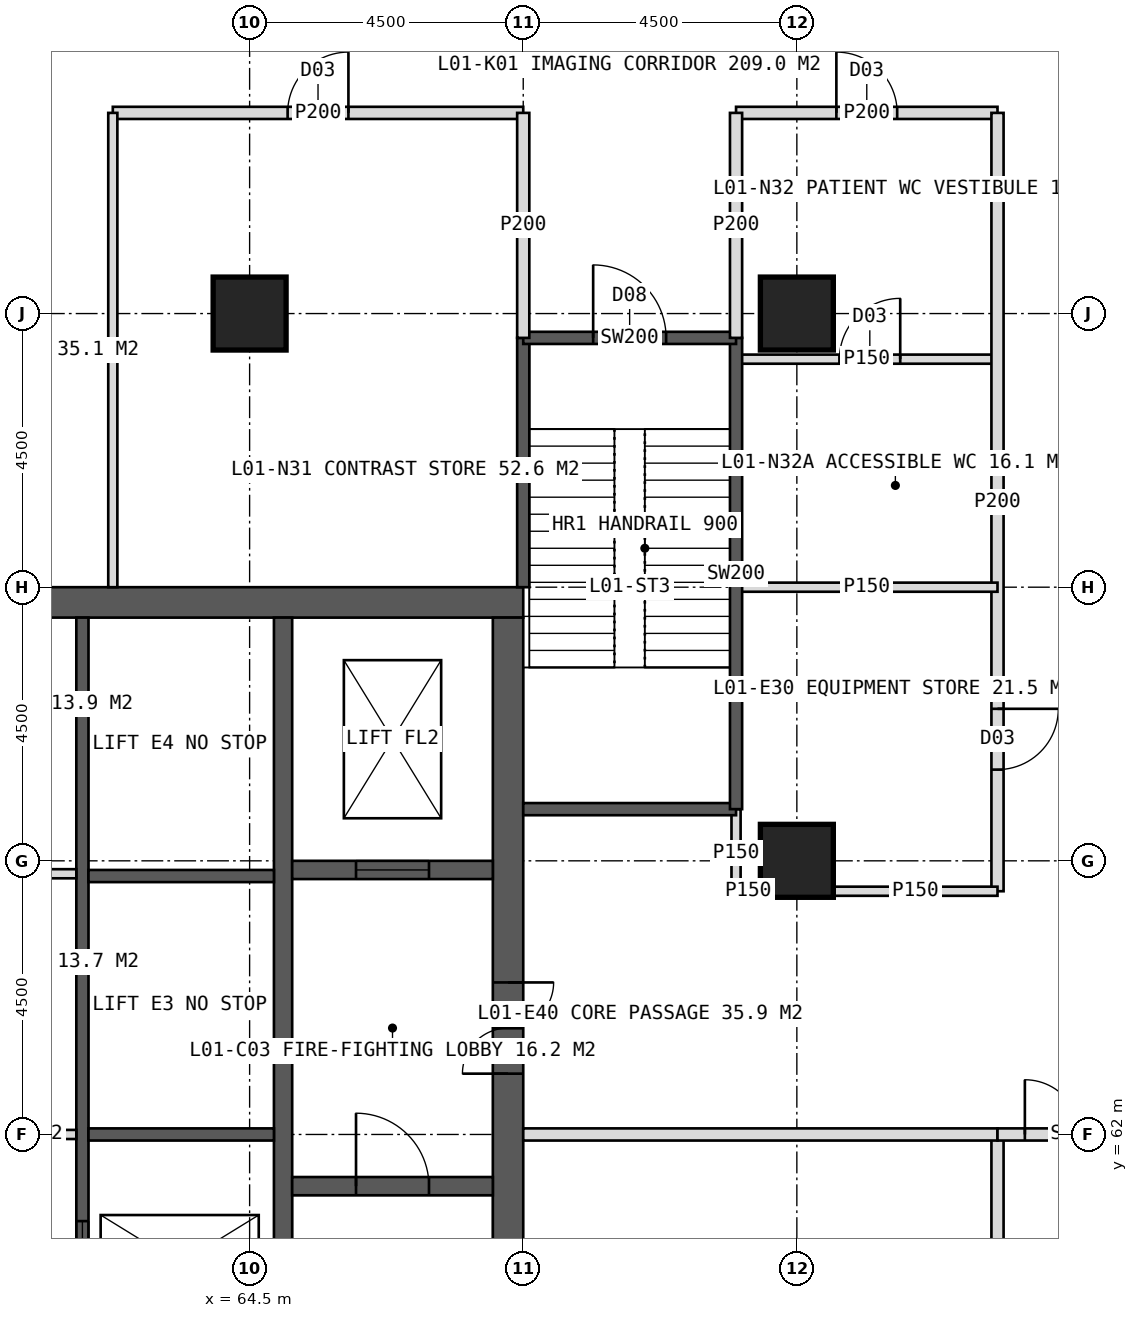
"""IFC4 building model, lengths in metres.
Left out: names, types, materials, properties, quantities, classifications, styles, units other than length and angle.
Written with IfcOpenShell. Run it as: python <this file> out.ifc"""

import sys

from ifc_helpers import new_model, si_unit, direction, frame, frame_2d, origin, origin_2d, place, context, subcontext, project, spatial, rectangle, hollow_rectangle, extrude, element, fill, save


model = new_model("IFC4")
c1 = context("Model", 3, precision=1e-05, world=origin(), true_north=direction((0.0, 1.0)))
c2 = subcontext(c1, "Body", "Model", "MODEL_VIEW")
j1 = project(units=[si_unit("LENGTHUNIT", "METRE"), si_unit("PLANEANGLEUNIT", "RADIAN")], contexts=[c1])
p1 = place(None, origin())
s1 = spatial("IfcSite", under=j1, at=p1, CompositionType="ELEMENT")
p2 = place(p1, origin())
s2 = spatial("IfcBuilding", under=s1, at=p2, CompositionType="ELEMENT")
p3 = place(p2, frame((0.0, 0.0, 6.0)))
s3 = spatial("IfcBuildingStorey", under=s2, at=p3, CompositionType="ELEMENT", Elevation=6.0)
p4 = place(p3, frame((51.0, 70.75, 0.0), z_axis=(0.0, 0.0, 1.0), x_axis=(1.0, 0.0, 0.0)))
e1 = element("IfcWall", 1, at=p4, inside=s3, PredefinedType="SHEAR", context=c2, shape_type="SweptSolid", body=[
    extrude(rectangle(XDim=18.0, YDim=0.5, at=frame_2d((9.0, 0.0))), origin(), (0.0, 0.0, 1.0), 5.0),
])
p5 = place(p4, frame((8.1, 0.0, 0.0)))
e2 = element("IfcOpeningElement", 2, at=p5, cuts=e1, PredefinedType="OPENING", context=c2, shape_type="SweptSolid", body=[
    extrude(rectangle(XDim=1.8, YDim=2.2, at=frame_2d((0.9, 1.1))), frame((0.0, 0.26, 0.0), z_axis=(0.0, -1.0, 0.0), x_axis=(1.0, 0.0, 0.0)), (0.0, 0.0, 1.0), 0.52),
])
p6 = place(p3, frame((68.75, 53.5, 0.0), z_axis=(0.0, 0.0, 1.0), x_axis=(0.0, 1.0, 0.0)))
e3 = element("IfcWall", 3, at=p6, inside=s3, PredefinedType="SHEAR", context=c2, shape_type="SweptSolid", body=[
    extrude(rectangle(XDim=17.0, YDim=0.5, at=frame_2d((8.5, 0.0))), origin(), (0.0, 0.0, 1.0), 5.0),
])
p7 = place(p6, frame((9.5, 0.0, 0.0)))
e4 = element("IfcOpeningElement", 4, at=p7, cuts=e3, PredefinedType="OPENING", context=c2, shape_type="SweptSolid", body=[
    extrude(rectangle(XDim=1.5, YDim=2.2, at=frame_2d((0.75, 1.1))), frame((0.0, 0.26, 0.0), z_axis=(0.0, -1.0, 0.0), x_axis=(1.0, 0.0, 0.0)), (0.0, 0.0, 1.0), 0.52),
])
p8 = place(p3, frame((65.05, 53.5, 0.0), z_axis=(0.0, 0.0, 1.0), x_axis=(0.0, 1.0, 0.0)))
e5 = element("IfcWall", 5, at=p8, inside=s3, PredefinedType="SHEAR", context=c2, shape_type="SweptSolid", body=[
    extrude(rectangle(XDim=17.0, YDim=0.3, at=frame_2d((8.5, 0.0))), origin(), (0.0, 0.0, 1.0), 5.0),
])
p9 = place(p3, frame((61.75, 53.5, 0.0), z_axis=(0.0, 0.0, 1.0), x_axis=(0.0, 1.0, 0.0)))
e6 = element("IfcWall", 6, at=p9, inside=s3, PredefinedType="SHEAR", context=c2, shape_type="SweptSolid", body=[
    extrude(rectangle(XDim=17.0, YDim=0.2, at=frame_2d((8.5, 0.0))), origin(), (0.0, 0.0, 1.0), 5.0),
])
p10 = place(p9, frame((1.375, 0.0, 0.0)))
e7 = element("IfcOpeningElement", 7, at=p10, cuts=e6, PredefinedType="OPENING", context=c2, shape_type="SweptSolid", body=[
    extrude(rectangle(XDim=1.4, YDim=2.2, at=frame_2d((0.7, 1.1))), frame((0.0, 0.11, 0.0), z_axis=(0.0, -1.0, 0.0), x_axis=(1.0, 0.0, 0.0)), (0.0, 0.0, 1.0), 0.22),
])
p11 = place(p9, frame((5.675, 0.0, 0.0)))
e8 = element("IfcOpeningElement", 8, at=p11, cuts=e6, PredefinedType="OPENING", context=c2, shape_type="SweptSolid", body=[
    extrude(rectangle(XDim=1.4, YDim=2.2, at=frame_2d((0.7, 1.1))), frame((0.0, 0.11, 0.0), z_axis=(0.0, -1.0, 0.0), x_axis=(1.0, 0.0, 0.0)), (0.0, 0.0, 1.0), 0.22),
])
for number, where, z_axis, x_axis in (
    (9, (61.85, 62.0, 0.0), (0.0, 0.0, 1.0), (1.0, 0.0, 0.0)),
    (10, (61.85, 66.25, 0.0), (0.0, 0.0, 1.0), (1.0, 0.0, 0.0)),
):
    element("IfcWall", number, at=place(p3, frame(where, z_axis=z_axis, x_axis=x_axis)), inside=s3, PredefinedType="SHEAR", context=c2, shape_type="SweptSolid", body=[
        extrude(rectangle(XDim=3.05, YDim=0.2, at=frame_2d((1.525, 0.0))), origin(), (0.0, 0.0, 1.0), 5.0),
    ])
p12 = place(p3, frame((65.2, 61.15, 0.0), z_axis=(0.0, 0.0, 1.0), x_axis=(1.0, 0.0, 0.0)))
e11 = element("IfcWall", 11, at=p12, inside=s3, PredefinedType="SHEAR", context=c2, shape_type="SweptSolid", body=[
    extrude(rectangle(XDim=3.3, YDim=0.3, at=frame_2d((1.65, 0.0))), origin(), (0.0, 0.0, 1.0), 5.0),
])
p13 = place(p12, frame((1.05, 0.0, 0.0)))
e12 = element("IfcOpeningElement", 12, at=p13, cuts=e11, PredefinedType="OPENING", context=c2, shape_type="SweptSolid", body=[
    extrude(rectangle(XDim=1.2, YDim=2.1, at=frame_2d((0.6, 1.05))), frame((0.0, 0.16, 0.0), z_axis=(0.0, -1.0, 0.0), x_axis=(1.0, 0.0, 0.0)), (0.0, 0.0, 1.0), 0.32),
])
p14 = place(p3, frame((65.2, 66.35, 0.0), z_axis=(0.0, 0.0, 1.0), x_axis=(1.0, 0.0, 0.0)))
e13 = element("IfcWall", 13, at=p14, inside=s3, PredefinedType="SHEAR", context=c2, shape_type="SweptSolid", body=[
    extrude(rectangle(XDim=3.3, YDim=0.3, at=frame_2d((1.65, 0.0))), origin(), (0.0, 0.0, 1.0), 5.0),
])
p15 = place(p14, frame((1.05, 0.0, 0.0)))
e14 = element("IfcOpeningElement", 14, at=p15, cuts=e13, PredefinedType="OPENING", context=c2, shape_type="SweptSolid", body=[
    extrude(rectangle(XDim=1.2, YDim=2.2, at=frame_2d((0.6, 1.1))), frame((0.0, 0.16, 0.0), z_axis=(0.0, -1.0, 0.0), x_axis=(1.0, 0.0, 0.0)), (0.0, 0.0, 1.0), 0.32),
])
for number, where, z_axis, x_axis in (
    (15, (73.5, 75.5, 0.0), (0.0, 0.0, 1.0), (1.0, 0.0, 0.0)),
    (16, (64.5, 75.5, 0.0), (0.0, 0.0, 1.0), (1.0, 0.0, 0.0)),
    (17, (73.5, 66.5, 0.0), (0.0, 0.0, 1.0), (1.0, 0.0, 0.0)),
):
    element("IfcColumn", number, at=place(p3, frame(where, z_axis=z_axis, x_axis=x_axis)), inside=s3, PredefinedType="COLUMN", context=c2, shape_type="SweptSolid", body=[
        extrude(hollow_rectangle(XDim=1.2, YDim=1.2, WallThickness=0.1, at=origin_2d()), origin(), (0.0, 0.0, 1.0), 5.0),
    ])
p16 = place(p3, frame((62.25, 78.8, 0.0), z_axis=(0.0, 0.0, 1.0), x_axis=(1.0, 0.0, 0.0)))
e18 = element("IfcWall", 18, at=p16, inside=s3, PredefinedType="PARTITIONING", context=c2, shape_type="SweptSolid", body=[
    extrude(rectangle(XDim=6.75, YDim=0.2, at=frame_2d((3.375, 0.0))), origin(), (0.0, 0.0, 1.0), 4.7),
])
p17 = place(p16, frame((2.875, 0.0, 0.0)))
e19 = element("IfcOpeningElement", 19, at=p17, cuts=e18, PredefinedType="OPENING", context=c2, shape_type="SweptSolid", body=[
    extrude(rectangle(XDim=1.0, YDim=2.1, at=frame_2d((0.5, 1.05))), frame((0.0, 0.11, 0.0), z_axis=(0.0, -1.0, 0.0), x_axis=(1.0, 0.0, 0.0)), (0.0, 0.0, 1.0), 0.22),
])
p18 = place(p3, frame((72.5, 78.8, 0.0), z_axis=(0.0, 0.0, 1.0), x_axis=(1.0, 0.0, 0.0)))
e20 = element("IfcWall", 20, at=p18, inside=s3, PredefinedType="PARTITIONING", context=c2, shape_type="SweptSolid", body=[
    extrude(rectangle(XDim=4.3, YDim=0.2, at=frame_2d((2.15, 0.0))), origin(), (0.0, 0.0, 1.0), 4.7),
])
p19 = place(p18, frame((1.65, 0.0, 0.0)))
e21 = element("IfcOpeningElement", 21, at=p19, cuts=e20, PredefinedType="OPENING", context=c2, shape_type="SweptSolid", body=[
    extrude(rectangle(XDim=1.0, YDim=2.1, at=frame_2d((0.5, 1.05))), frame((0.0, 0.11, 0.0), z_axis=(0.0, -1.0, 0.0), x_axis=(1.0, 0.0, 0.0)), (0.0, 0.0, 1.0), 0.22),
])
p20 = place(p3, frame((62.25, 71.0, 0.0), z_axis=(0.0, 0.0, 1.0), x_axis=(0.0, 1.0, 0.0)))
e22 = element("IfcWall", 22, at=p20, inside=s3, PredefinedType="PARTITIONING", context=c2, shape_type="SweptSolid", body=[
    extrude(rectangle(XDim=7.8, YDim=0.15, at=frame_2d((3.9, 0.0))), origin(), (0.0, 0.0, 1.0), 4.7),
])
p21 = place(p3, frame((72.5, 74.75, 0.0), z_axis=(0.0, 0.0, 1.0), x_axis=(1.0, 0.0, 0.0)))
e23 = element("IfcWall", 23, at=p21, inside=s3, PredefinedType="PARTITIONING", context=c2, shape_type="SweptSolid", body=[
    extrude(rectangle(XDim=4.3, YDim=0.15, at=frame_2d((2.15, 0.0))), origin(), (0.0, 0.0, 1.0), 4.7),
])
p22 = place(p21, frame((1.7, 0.0, 0.0)))
e24 = element("IfcOpeningElement", 24, at=p22, cuts=e23, PredefinedType="OPENING", context=c2, shape_type="SweptSolid", body=[
    extrude(rectangle(XDim=1.0, YDim=2.1, at=frame_2d((0.5, 1.05))), frame((0.0, 0.085, 0.0), z_axis=(0.0, -1.0, 0.0), x_axis=(1.0, 0.0, 0.0)), (0.0, 0.0, 1.0), 0.17),
])
p23 = place(p3, frame((76.8, 78.8, 0.0), z_axis=(0.0, 0.0, 1.0), x_axis=(0.0, -1.0, 0.0)))
e25 = element("IfcWall", 25, at=p23, inside=s3, PredefinedType="PARTITIONING", context=c2, shape_type="SweptSolid", body=[
    extrude(rectangle(XDim=12.8, YDim=0.2, at=frame_2d((6.4, 0.0))), origin(), (0.0, 0.0, 1.0), 4.7),
])
p24 = place(p23, frame((9.8, 0.0, 0.0)))
e26 = element("IfcOpeningElement", 26, at=p24, cuts=e25, PredefinedType="OPENING", context=c2, shape_type="SweptSolid", body=[
    extrude(rectangle(XDim=1.0, YDim=2.1, at=frame_2d((0.5, 1.05))), frame((0.0, 0.11, 0.0), z_axis=(0.0, -1.0, 0.0), x_axis=(1.0, 0.0, 0.0)), (0.0, 0.0, 1.0), 0.22),
])
p25 = place(p3, frame((76.8, 62.0, 0.0), z_axis=(0.0, 0.0, 1.0), x_axis=(0.0, -1.0, 0.0)))
e27 = element("IfcWall", 27, at=p25, inside=s3, PredefinedType="PARTITIONING", context=c2, shape_type="SweptSolid", body=[
    extrude(rectangle(XDim=16.8, YDim=0.2, at=frame_2d((8.4, 0.0))), origin(), (0.0, 0.0, 1.0), 4.7),
])
p26 = place(p25, frame((4.0, 0.0, 0.0)))
e28 = element("IfcOpeningElement", 28, at=p26, cuts=e27, PredefinedType="OPENING", context=c2, shape_type="SweptSolid", body=[
    extrude(rectangle(XDim=1.0, YDim=2.1, at=frame_2d((0.5, 1.05))), frame((0.0, 0.11, 0.0), z_axis=(0.0, -1.0, 0.0), x_axis=(1.0, 0.0, 0.0)), (0.0, 0.0, 1.0), 0.22),
])
p27 = place(p25, frame((9.75, 0.0, 0.0)))
e29 = element("IfcOpeningElement", 29, at=p27, cuts=e27, PredefinedType="OPENING", context=c2, shape_type="SweptSolid", body=[
    extrude(rectangle(XDim=0.9, YDim=2.1, at=frame_2d((0.45, 1.05))), frame((0.0, 0.11, 0.0), z_axis=(0.0, -1.0, 0.0), x_axis=(1.0, 0.0, 0.0)), (0.0, 0.0, 1.0), 0.22),
])
p28 = place(p25, frame((13.6, 0.0, 0.0)))
e30 = element("IfcOpeningElement", 30, at=p28, cuts=e27, PredefinedType="OPENING", context=c2, shape_type="SweptSolid", body=[
    extrude(rectangle(XDim=1.0, YDim=2.1, at=frame_2d((0.5, 1.05))), frame((0.0, 0.11, 0.0), z_axis=(0.0, -1.0, 0.0), x_axis=(1.0, 0.0, 0.0)), (0.0, 0.0, 1.0), 0.22),
])
p29 = place(p3, frame((72.5, 71.0, 0.0), z_axis=(0.0, 0.0, 1.0), x_axis=(1.0, 0.0, 0.0)))
e31 = element("IfcWall", 31, at=p29, inside=s3, PredefinedType="PARTITIONING", context=c2, shape_type="SweptSolid", body=[
    extrude(rectangle(XDim=4.3, YDim=0.15, at=frame_2d((2.15, 0.0))), origin(), (0.0, 0.0, 1.0), 4.7),
])
p30 = place(p3, frame((72.5, 66.0, 0.0), z_axis=(0.0, 0.0, 1.0), x_axis=(1.0, 0.0, 0.0)))
e32 = element("IfcWall", 32, at=p30, inside=s3, PredefinedType="PARTITIONING", context=c2, shape_type="SweptSolid", body=[
    extrude(rectangle(XDim=0.4, YDim=0.15, at=frame_2d((0.2, 0.0))), origin(), (0.0, 0.0, 1.0), 4.7),
])
p31 = place(p3, frame((74.1, 66.0, 0.0), z_axis=(0.0, 0.0, 1.0), x_axis=(1.0, 0.0, 0.0)))
e33 = element("IfcWall", 33, at=p31, inside=s3, PredefinedType="PARTITIONING", context=c2, shape_type="SweptSolid", body=[
    extrude(rectangle(XDim=2.7, YDim=0.15, at=frame_2d((1.35, 0.0))), origin(), (0.0, 0.0, 1.0), 4.7),
])
p32 = place(p3, frame((69.0, 62.0, 0.0), z_axis=(0.0, 0.0, 1.0), x_axis=(1.0, 0.0, 0.0)))
e34 = element("IfcWall", 34, at=p32, inside=s3, PredefinedType="SOLIDWALL", context=c2, shape_type="SweptSolid", body=[
    extrude(rectangle(XDim=7.8, YDim=0.2, at=frame_2d((3.9, 0.0))), origin(), (0.0, 0.0, 1.0), 3.9),
])
p33 = place(p3, frame((76.8, 62.0, 0.0), z_axis=(0.0, 0.0, 1.0), x_axis=(1.0, 0.0, 0.0)))
e35 = element("IfcWall", 35, at=p33, inside=s3, PredefinedType="SOLIDWALL", context=c2, shape_type="SweptSolid", body=[
    extrude(rectangle(XDim=2.7, YDim=0.2, at=frame_2d((1.35, 0.0))), origin(), (0.0, 0.0, 1.0), 3.9),
])
p34 = place(p33, frame((0.45, 0.0, 0.0)))
e36 = element("IfcOpeningElement", 36, at=p34, cuts=e35, PredefinedType="OPENING", context=c2, shape_type="SweptSolid", body=[
    extrude(rectangle(XDim=1.8, YDim=2.2, at=frame_2d((0.9, 1.1))), frame((0.0, 0.11, 0.0), z_axis=(0.0, -1.0, 0.0), x_axis=(1.0, 0.0, 0.0)), (0.0, 0.0, 1.0), 0.22),
])
p35 = place(p3, frame((58.35, 62.0, 0.0), z_axis=(0.0, 0.0, 1.0), x_axis=(1.0, 0.0, 0.0)))
e37 = element("IfcWall", 37, at=p35, inside=s3, PredefinedType="PARTITIONING", context=c2, shape_type="SweptSolid", body=[
    extrude(rectangle(XDim=3.3, YDim=0.15, at=frame_2d((1.65, 0.0))), origin(), (0.0, 0.0, 1.0), 4.7),
])
p36 = place(p35, frame((1.15, 0.0, 0.0)))
e38 = element("IfcOpeningElement", 38, at=p36, cuts=e37, PredefinedType="OPENING", context=c2, shape_type="SweptSolid", body=[
    extrude(rectangle(XDim=1.0, YDim=2.1, at=frame_2d((0.5, 1.05))), frame((0.0, 0.085, 0.0), z_axis=(0.0, -1.0, 0.0), x_axis=(1.0, 0.0, 0.0)), (0.0, 0.0, 1.0), 0.17),
])
p37 = place(p3, frame((58.35, 66.288, 0.0), z_axis=(0.0, 0.0, 1.0), x_axis=(1.0, 0.0, 0.0)))
e39 = element("IfcWall", 39, at=p37, inside=s3, PredefinedType="PARTITIONING", context=c2, shape_type="SweptSolid", body=[
    extrude(rectangle(XDim=3.3, YDim=0.15, at=frame_2d((1.65, 0.0))), origin(), (0.0, 0.0, 1.0), 4.7),
])
p38 = place(p3, frame((72.5, 65.9, 0.0), z_axis=(0.0, 0.0, 1.0), x_axis=(0.0, 1.0, 0.0)))
e40 = element("IfcWall", 40, at=p38, inside=s3, PredefinedType="PARTITIONING", context=c2, shape_type="SweptSolid", body=[
    extrude(rectangle(XDim=1.45, YDim=0.15, at=frame_2d((0.725, 0.0))), origin(), (0.0, 0.0, 1.0), 4.7),
])
p39 = place(p3, frame((69.0, 71.0, 0.0), z_axis=(0.0, 0.0, 1.0), x_axis=(0.0, 1.0, 0.0)))
e41 = element("IfcWall", 41, at=p39, inside=s3, PredefinedType="SOLIDWALL", context=c2, shape_type="SweptSolid", body=[
    extrude(rectangle(XDim=4.1, YDim=0.2, at=frame_2d((2.05, 0.0))), origin(), (0.0, 0.0, 1.0), 4.7),
])
p40 = place(p3, frame((69.0, 67.35, 0.0), z_axis=(0.0, 0.0, 1.0), x_axis=(1.0, 0.0, 0.0)))
e42 = element("IfcWall", 42, at=p40, inside=s3, PredefinedType="SOLIDWALL", context=c2, shape_type="SweptSolid", body=[
    extrude(rectangle(XDim=3.5, YDim=0.2, at=frame_2d((1.75, 0.0))), origin(), (0.0, 0.0, 1.0), 4.7),
])
p41 = place(p3, frame((72.5, 67.35, 0.0), z_axis=(0.0, 0.0, 1.0), x_axis=(0.0, 1.0, 0.0)))
e43 = element("IfcWall", 43, at=p41, inside=s3, PredefinedType="SOLIDWALL", context=c2, shape_type="SweptSolid", body=[
    extrude(rectangle(XDim=7.75, YDim=0.2, at=frame_2d((3.875, 0.0))), origin(), (0.0, 0.0, 1.0), 4.7),
])
p42 = place(p3, frame((69.0, 75.1, 0.0), z_axis=(0.0, 0.0, 1.0), x_axis=(1.0, 0.0, 0.0)))
e44 = element("IfcWall", 44, at=p42, inside=s3, PredefinedType="SOLIDWALL", context=c2, shape_type="SweptSolid", body=[
    extrude(rectangle(XDim=3.5, YDim=0.2, at=frame_2d((1.75, 0.0))), origin(), (0.0, 0.0, 1.0), 4.7),
])
p43 = place(p42, frame((1.15, 0.0, 0.0)))
e45 = element("IfcOpeningElement", 45, at=p43, cuts=e44, PredefinedType="OPENING", context=c2, shape_type="SweptSolid", body=[
    extrude(rectangle(XDim=1.2, YDim=2.1, at=frame_2d((0.6, 1.05))), frame((0.0, 0.11, 0.0), z_axis=(0.0, -1.0, 0.0), x_axis=(1.0, 0.0, 0.0)), (0.0, 0.0, 1.0), 0.22),
])
for number, where, z_axis, x_axis in (
    (46, (69.0, 75.1, 0.0), (0.0, 0.0, 1.0), (0.0, 1.0, 0.0)),
    (47, (72.5, 75.1, 0.0), (0.0, 0.0, 1.0), (0.0, 1.0, 0.0)),
):
    element("IfcWall", number, at=place(p3, frame(where, z_axis=z_axis, x_axis=x_axis)), inside=s3, PredefinedType="PARTITIONING", context=c2, shape_type="SweptSolid", body=[
        extrude(rectangle(XDim=3.7, YDim=0.2, at=frame_2d((1.85, 0.0))), origin(), (0.0, 0.0, 1.0), 4.7),
    ])
p44 = place(p17, origin())
e48 = element("IfcDoor", 48, at=p44, inside=s3, OperationType="SINGLE_SWING_RIGHT", PredefinedType="DOOR", context=c2, shape_type="SweptSolid", body=[
    extrude(rectangle(XDim=1.0, YDim=2.1, at=frame_2d((0.5, 1.05))), frame((0.0, 0.025, 0.0), z_axis=(0.0, -1.0, 0.0), x_axis=(1.0, 0.0, 0.0)), (0.0, 0.0, 1.0), 0.05),
])
fill(e19, e48)
p45 = place(p19, origin())
e49 = element("IfcDoor", 49, at=p45, inside=s3, OperationType="SINGLE_SWING_LEFT", PredefinedType="DOOR", context=c2, shape_type="SweptSolid", body=[
    extrude(rectangle(XDim=1.0, YDim=2.1, at=frame_2d((0.5, 1.05))), frame((0.0, 0.025, 0.0), z_axis=(0.0, -1.0, 0.0), x_axis=(1.0, 0.0, 0.0)), (0.0, 0.0, 1.0), 0.05),
])
fill(e21, e49)
p46 = place(p24, origin())
e50 = element("IfcDoor", 50, at=p46, inside=s3, OperationType="SINGLE_SWING_LEFT", PredefinedType="DOOR", context=c2, shape_type="SweptSolid", body=[
    extrude(rectangle(XDim=1.0, YDim=2.1, at=frame_2d((0.5, 1.05))), frame((0.0, 0.025, 0.0), z_axis=(0.0, -1.0, 0.0), x_axis=(1.0, 0.0, 0.0)), (0.0, 0.0, 1.0), 0.05),
])
fill(e26, e50)
p47 = place(p34, origin())
e51 = element("IfcDoor", 51, at=p47, inside=s3, OperationType="DOUBLE_DOOR_DOUBLE_SWING", PredefinedType="DOOR", context=c2, shape_type="SweptSolid", body=[
    extrude(rectangle(XDim=1.8, YDim=2.2, at=frame_2d((0.9, 1.1))), frame((0.0, 0.025, 0.0), z_axis=(0.0, -1.0, 0.0), x_axis=(1.0, 0.0, 0.0)), (0.0, 0.0, 1.0), 0.05),
])
fill(e36, e51)
p48 = place(p7, origin())
e52 = element("IfcDoor", 52, at=p48, inside=s3, OperationType="DOUBLE_DOOR_SINGLE_SWING", PredefinedType="DOOR", context=c2, shape_type="SweptSolid", body=[
    extrude(rectangle(XDim=1.5, YDim=2.2, at=frame_2d((0.75, 1.1))), frame((0.0, 0.025, 0.0), z_axis=(0.0, -1.0, 0.0), x_axis=(1.0, 0.0, 0.0)), (0.0, 0.0, 1.0), 0.05),
])
fill(e4, e52)
p49 = place(p13, origin())
e53 = element("IfcDoor", 53, at=p49, inside=s3, OperationType="SINGLE_SWING_LEFT", PredefinedType="DOOR", context=c2, shape_type="SweptSolid", body=[
    extrude(rectangle(XDim=1.2, YDim=2.1, at=frame_2d((0.6, 1.05))), frame((0.0, 0.025, 0.0), z_axis=(0.0, -1.0, 0.0), x_axis=(1.0, 0.0, 0.0)), (0.0, 0.0, 1.0), 0.05),
])
fill(e12, e53)
p50 = place(p15, origin())
e54 = element("IfcDoor", 54, at=p50, inside=s3, OperationType="SLIDING_TO_LEFT", PredefinedType="DOOR", context=c2, shape_type="SweptSolid", body=[
    extrude(rectangle(XDim=1.2, YDim=2.2, at=frame_2d((0.6, 1.1))), frame((0.0, 0.025, 0.0), z_axis=(0.0, -1.0, 0.0), x_axis=(1.0, 0.0, 0.0)), (0.0, 0.0, 1.0), 0.05),
])
fill(e14, e54)
p51 = place(p11, origin())
e55 = element("IfcDoor", 55, at=p51, inside=s3, OperationType="SLIDING_TO_LEFT", PredefinedType="DOOR", context=c2, shape_type="SweptSolid", body=[
    extrude(rectangle(XDim=1.4, YDim=2.2, at=frame_2d((0.7, 1.1))), frame((0.0, 0.025, 0.0), z_axis=(0.0, -1.0, 0.0), x_axis=(1.0, 0.0, 0.0)), (0.0, 0.0, 1.0), 0.05),
])
fill(e8, e55)
p52 = place(p22, origin())
e56 = element("IfcDoor", 56, at=p52, inside=s3, OperationType="SINGLE_SWING_RIGHT", PredefinedType="DOOR", context=c2, shape_type="SweptSolid", body=[
    extrude(rectangle(XDim=1.0, YDim=2.1, at=frame_2d((0.5, 1.05))), frame((0.0, 0.025, 0.0), z_axis=(0.0, -1.0, 0.0), x_axis=(1.0, 0.0, 0.0)), (0.0, 0.0, 1.0), 0.05),
])
fill(e24, e56)
p53 = place(p43, origin())
e57 = element("IfcDoor", 57, at=p53, inside=s3, OperationType="SINGLE_SWING_LEFT", PredefinedType="DOOR", context=c2, shape_type="SweptSolid", body=[
    extrude(rectangle(XDim=1.2, YDim=2.1, at=frame_2d((0.6, 1.05))), frame((0.0, 0.025, 0.0), z_axis=(0.0, -1.0, 0.0), x_axis=(1.0, 0.0, 0.0)), (0.0, 0.0, 1.0), 0.05),
])
fill(e45, e57)
save(model, sys.argv[1])
